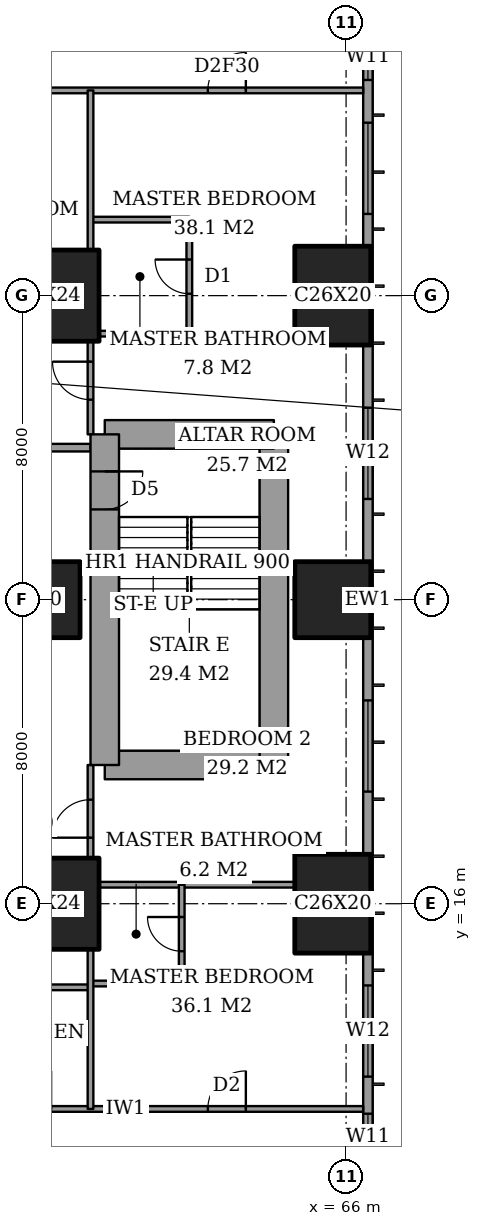
"""IFC4 building model, lengths in metres.
Left out: names, types, materials, properties, quantities, classifications, styles, units other than length and angle.
Written with IfcOpenShell. Run it as: python <this file> out.ifc"""

import sys

from ifc_helpers import new_model, si_unit, direction, frame, frame_2d, origin, origin_2d, place, context, subcontext, project, spatial, rectangle, extrude, element, fill, save


model = new_model("IFC4")
c1 = context("Model", 3, precision=1e-05, world=origin(), true_north=direction((0.0, 1.0)))
c2 = subcontext(c1, "Body", "Model", "MODEL_VIEW")
j1 = project(units=[si_unit("LENGTHUNIT", "METRE"), si_unit("PLANEANGLEUNIT", "RADIAN")], contexts=[c1])
p1 = place(None, origin())
s1 = spatial("IfcSite", under=j1, at=p1, CompositionType="ELEMENT")
p2 = place(p1, origin())
s2 = spatial("IfcBuilding", under=s1, at=p2, CompositionType="ELEMENT")
p3 = place(p2, frame((0.0, 0.0, 99.8)))
s3 = spatial("IfcBuildingStorey", under=s2, at=p3, CompositionType="ELEMENT", Elevation=99.8)
p4 = place(p3, frame((58.0, 16.0, 0.0), z_axis=(0.0, 0.0, 1.0), x_axis=(1.0, 0.0, 0.0)))
e1 = element("IfcColumn", 1, at=p4, inside=s3, PredefinedType="COLUMN", context=c2, shape_type="SweptSolid", body=[
    extrude(rectangle(XDim=3.0, YDim=2.4, at=origin_2d()), origin(), (0.0, 0.0, 1.0), 3.6),
])
p5 = place(p3, frame((58.0, 24.0, 0.0), z_axis=(0.0, 0.0, 1.0), x_axis=(1.0, 0.0, 0.0)))
e2 = element("IfcColumn", 2, at=p5, inside=s3, PredefinedType="COLUMN", context=c2, shape_type="SweptSolid", body=[
    extrude(rectangle(XDim=2.0, YDim=2.0, at=origin_2d()), origin(), (0.0, 0.0, 1.0), 3.6),
])
p6 = place(p3, frame((58.0, 32.0, 0.0), z_axis=(0.0, 0.0, 1.0), x_axis=(1.0, 0.0, 0.0)))
e3 = element("IfcColumn", 3, at=p6, inside=s3, PredefinedType="COLUMN", context=c2, shape_type="SweptSolid", body=[
    extrude(rectangle(XDim=3.0, YDim=2.4, at=origin_2d()), origin(), (0.0, 0.0, 1.0), 3.6),
])
p7 = place(p3, frame((65.65, 16.0, 0.0), z_axis=(0.0, 0.0, 1.0), x_axis=(0.0, 1.0, 0.0)))
e4 = element("IfcColumn", 4, at=p7, inside=s3, PredefinedType="COLUMN", context=c2, shape_type="SweptSolid", body=[
    extrude(rectangle(XDim=2.6, YDim=2.0, at=origin_2d()), origin(), (0.0, 0.0, 1.0), 3.6),
])
p8 = place(p3, frame((65.65, 24.0, 0.0), z_axis=(0.0, 0.0, 1.0), x_axis=(1.0, 0.0, 0.0)))
e5 = element("IfcColumn", 5, at=p8, inside=s3, PredefinedType="COLUMN", context=c2, shape_type="SweptSolid", body=[
    extrude(rectangle(XDim=2.0, YDim=2.0, at=origin_2d()), origin(), (0.0, 0.0, 1.0), 3.6),
])
p9 = place(p3, frame((65.65, 32.0, 0.0), z_axis=(0.0, 0.0, 1.0), x_axis=(0.0, 1.0, 0.0)))
e6 = element("IfcColumn", 6, at=p9, inside=s3, PredefinedType="COLUMN", context=c2, shape_type="SweptSolid", body=[
    extrude(rectangle(XDim=2.6, YDim=2.0, at=origin_2d()), origin(), (0.0, 0.0, 1.0), 3.6),
])
p10 = place(p3, frame((59.65, 19.65, 0.0), z_axis=(0.0, 0.0, 1.0), x_axis=(1.0, 0.0, 0.0)))
e7 = element("IfcWall", 7, at=p10, inside=s3, PredefinedType="SHEAR", context=c2, shape_type="SweptSolid", body=[
    extrude(rectangle(XDim=4.45, YDim=0.75, at=frame_2d((2.225, 0.0))), origin(), (0.0, 0.0, 1.0), 3.6),
])
p11 = place(p3, frame((64.1, 19.65, 0.0), z_axis=(0.0, 0.0, 1.0), x_axis=(0.0, 1.0, 0.0)))
e8 = element("IfcWall", 8, at=p11, inside=s3, PredefinedType="SHEAR", context=c2, shape_type="SweptSolid", body=[
    extrude(rectangle(XDim=8.7, YDim=0.75, at=frame_2d((4.35, 0.0))), origin(), (0.0, 0.0, 1.0), 3.6),
])
p12 = place(p3, frame((64.1, 28.35, 0.0), z_axis=(0.0, 0.0, 1.0), x_axis=(-1.0, 0.0, 0.0)))
e9 = element("IfcWall", 9, at=p12, inside=s3, PredefinedType="SHEAR", context=c2, shape_type="SweptSolid", body=[
    extrude(rectangle(XDim=4.45, YDim=0.75, at=frame_2d((2.225, 0.0))), origin(), (0.0, 0.0, 1.0), 3.6),
])
p13 = place(p3, frame((59.65, 28.35, 0.0), z_axis=(0.0, 0.0, 1.0), x_axis=(0.0, -1.0, 0.0)))
e10 = element("IfcWall", 10, at=p13, inside=s3, PredefinedType="SHEAR", context=c2, shape_type="SweptSolid", body=[
    extrude(rectangle(XDim=8.7, YDim=0.75, at=frame_2d((4.35, 0.0))), origin(), (0.0, 0.0, 1.0), 3.6),
])
p14 = place(p13, frame((0.975, 0.0, 0.0)))
e11 = element("IfcOpeningElement", 11, at=p14, cuts=e10, PredefinedType="OPENING", context=c2, shape_type="SweptSolid", body=[
    extrude(rectangle(XDim=1.0, YDim=2.1, at=frame_2d((0.5, 1.05))), frame((0.0, 0.385, 0.0), z_axis=(0.0, -1.0, 0.0), x_axis=(1.0, 0.0, 0.0)), (0.0, 0.0, 1.0), 0.77),
])
p15 = place(p3, frame((66.575, 3.175, 0.0), z_axis=(0.0, 0.0, 1.0), x_axis=(0.0, 1.0, 0.0)))
e12 = element("IfcWall", 12, at=p15, inside=s3, PredefinedType="SOLIDWALL", context=c2, shape_type="SweptSolid", body=[
    extrude(rectangle(XDim=41.65, YDim=0.25, at=frame_2d((20.825, 0.0))), origin(), (0.0, 0.0, 1.0), 3.6),
])
p16 = place(p15, frame((0.775, 0.0, 0.4)))
e13 = element("IfcOpeningElement", 13, at=p16, cuts=e12, PredefinedType="OPENING", context=c2, shape_type="SweptSolid", body=[
    extrude(rectangle(XDim=2.4, YDim=2.2, at=frame_2d((1.2, 1.1))), frame((0.0, 0.135, 0.0), z_axis=(0.0, -1.0, 0.0), x_axis=(1.0, 0.0, 0.0)), (0.0, 0.0, 1.0), 0.27),
])
p17 = place(p15, frame((6.1, 0.0, 0.4)))
e14 = element("IfcOpeningElement", 14, at=p17, cuts=e12, PredefinedType="OPENING", context=c2, shape_type="SweptSolid", body=[
    extrude(rectangle(XDim=1.2, YDim=2.2, at=frame_2d((0.6, 1.1))), frame((0.0, 0.135, 0.0), z_axis=(0.0, -1.0, 0.0), x_axis=(1.0, 0.0, 0.0)), (0.0, 0.0, 1.0), 0.27),
])
p18 = place(p15, frame((8.275, 0.0, 0.4)))
e15 = element("IfcOpeningElement", 15, at=p18, cuts=e12, PredefinedType="OPENING", context=c2, shape_type="SweptSolid", body=[
    extrude(rectangle(XDim=2.4, YDim=2.2, at=frame_2d((1.2, 1.1))), frame((0.0, 0.135, 0.0), z_axis=(0.0, -1.0, 0.0), x_axis=(1.0, 0.0, 0.0)), (0.0, 0.0, 1.0), 0.27),
])
p19 = place(p15, frame((15.775, 0.0, 0.4)))
e16 = element("IfcOpeningElement", 16, at=p19, cuts=e12, PredefinedType="OPENING", context=c2, shape_type="SweptSolid", body=[
    extrude(rectangle(XDim=2.4, YDim=2.2, at=frame_2d((1.2, 1.1))), frame((0.0, 0.135, 0.0), z_axis=(0.0, -1.0, 0.0), x_axis=(1.0, 0.0, 0.0)), (0.0, 0.0, 1.0), 0.27),
])
p20 = place(p15, frame((23.475, 0.0, 0.4)))
e17 = element("IfcOpeningElement", 17, at=p20, cuts=e12, PredefinedType="OPENING", context=c2, shape_type="SweptSolid", body=[
    extrude(rectangle(XDim=2.4, YDim=2.2, at=frame_2d((1.2, 1.1))), frame((0.0, 0.135, 0.0), z_axis=(0.0, -1.0, 0.0), x_axis=(1.0, 0.0, 0.0)), (0.0, 0.0, 1.0), 0.27),
])
p21 = place(p15, frame((30.975, 0.0, 0.4)))
e18 = element("IfcOpeningElement", 18, at=p21, cuts=e12, PredefinedType="OPENING", context=c2, shape_type="SweptSolid", body=[
    extrude(rectangle(XDim=2.4, YDim=2.2, at=frame_2d((1.2, 1.1))), frame((0.0, 0.135, 0.0), z_axis=(0.0, -1.0, 0.0), x_axis=(1.0, 0.0, 0.0)), (0.0, 0.0, 1.0), 0.27),
])
p22 = place(p15, frame((34.5, 0.0, 0.4)))
e19 = element("IfcOpeningElement", 19, at=p22, cuts=e12, PredefinedType="OPENING", context=c2, shape_type="SweptSolid", body=[
    extrude(rectangle(XDim=1.2, YDim=2.2, at=frame_2d((0.6, 1.1))), frame((0.0, 0.135, 0.0), z_axis=(0.0, -1.0, 0.0), x_axis=(1.0, 0.0, 0.0)), (0.0, 0.0, 1.0), 0.27),
])
p23 = place(p15, frame((38.475, 0.0, 0.4)))
e20 = element("IfcOpeningElement", 20, at=p23, cuts=e12, PredefinedType="OPENING", context=c2, shape_type="SweptSolid", body=[
    extrude(rectangle(XDim=2.4, YDim=2.2, at=frame_2d((1.2, 1.1))), frame((0.0, 0.135, 0.0), z_axis=(0.0, -1.0, 0.0), x_axis=(1.0, 0.0, 0.0)), (0.0, 0.0, 1.0), 0.27),
])
p24 = place(p3, frame((41.439, 10.6, 0.0), z_axis=(0.0, 0.0, 1.0), x_axis=(1.0, 0.0, 0.0)))
e21 = element("IfcWall", 21, at=p24, inside=s3, PredefinedType="PARTITIONING", context=c2, shape_type="SweptSolid", body=[
    extrude(rectangle(XDim=25.011, YDim=0.15, at=frame_2d((12.505, 0.0))), origin(), (0.0, 0.0, 1.0), 3.35),
])
p25 = place(p24, frame((10.761, 0.0, 0.0)))
e22 = element("IfcOpeningElement", 22, at=p25, cuts=e21, PredefinedType="OPENING", context=c2, shape_type="SweptSolid", body=[
    extrude(rectangle(XDim=1.0, YDim=2.1, at=frame_2d((0.5, 1.05))), frame((0.0, 0.085, 0.0), z_axis=(0.0, -1.0, 0.0), x_axis=(1.0, 0.0, 0.0)), (0.0, 0.0, 1.0), 0.17),
])
p26 = place(p24, frame((20.924, 0.0, 0.0)))
e23 = element("IfcOpeningElement", 23, at=p26, cuts=e21, PredefinedType="OPENING", context=c2, shape_type="SweptSolid", body=[
    extrude(rectangle(XDim=1.0, YDim=2.1, at=frame_2d((0.5, 1.05))), frame((0.0, 0.085, 0.0), z_axis=(0.0, -1.0, 0.0), x_axis=(1.0, 0.0, 0.0)), (0.0, 0.0, 1.0), 0.17),
])
p27 = place(p24, frame((15.799, 0.0, 0.0)))
e24 = element("IfcOpeningElement", 24, at=p27, cuts=e21, PredefinedType="OPENING", context=c2, shape_type="SweptSolid", body=[
    extrude(rectangle(XDim=1.0, YDim=2.1, at=frame_2d((0.5, 1.05))), frame((0.0, 0.085, 0.0), z_axis=(0.0, -1.0, 0.0), x_axis=(1.0, 0.0, 0.0)), (0.0, 0.0, 1.0), 0.17),
])
p28 = place(p24, frame((13.061, 0.0, 0.0)))
e25 = element("IfcOpeningElement", 25, at=p28, cuts=e21, PredefinedType="OPENING", context=c2, shape_type="SweptSolid", body=[
    extrude(rectangle(XDim=1.0, YDim=2.1, at=frame_2d((0.5, 1.05))), frame((0.0, 0.085, 0.0), z_axis=(0.0, -1.0, 0.0), x_axis=(1.0, 0.0, 0.0)), (0.0, 0.0, 1.0), 0.17),
])
p29 = place(p24, frame((7.911, 0.0, 0.0)))
e26 = element("IfcOpeningElement", 26, at=p29, cuts=e21, PredefinedType="OPENING", context=c2, shape_type="SweptSolid", body=[
    extrude(rectangle(XDim=0.9, YDim=2.1, at=frame_2d((0.45, 1.05))), frame((0.0, 0.085, 0.0), z_axis=(0.0, -1.0, 0.0), x_axis=(1.0, 0.0, 0.0)), (0.0, 0.0, 1.0), 0.17),
])
p30 = place(p24, frame((2.836, 0.0, 0.0)))
e27 = element("IfcOpeningElement", 27, at=p30, cuts=e21, PredefinedType="OPENING", context=c2, shape_type="SweptSolid", body=[
    extrude(rectangle(XDim=1.0, YDim=2.1, at=frame_2d((0.5, 1.05))), frame((0.0, 0.085, 0.0), z_axis=(0.0, -1.0, 0.0), x_axis=(1.0, 0.0, 0.0)), (0.0, 0.0, 1.0), 0.17),
])
p31 = place(p3, frame((56.2, 13.8, 0.0), z_axis=(0.0, 0.0, 1.0), x_axis=(1.0, 0.0, 0.0)))
e28 = element("IfcWall", 28, at=p31, inside=s3, PredefinedType="PARTITIONING", context=c2, shape_type="SweptSolid", body=[
    extrude(rectangle(XDim=3.075, YDim=0.15, at=frame_2d((1.538, 0.0))), origin(), (0.0, 0.0, 1.0), 3.35),
])
p32 = place(p3, frame((59.275, 13.9, 0.0), z_axis=(0.0, 0.0, 1.0), x_axis=(1.0, 0.0, 0.0)))
e29 = element("IfcWall", 29, at=p32, inside=s3, PredefinedType="PARTITIONING", context=c2, shape_type="SweptSolid", body=[
    extrude(rectangle(XDim=2.4, YDim=0.15, at=frame_2d((1.2, 0.0))), origin(), (0.0, 0.0, 1.0), 3.35),
])
p33 = place(p3, frame((59.5, 16.5, 0.0), z_axis=(0.0, 0.0, 1.0), x_axis=(1.0, 0.0, 0.0)))
e30 = element("IfcWall", 30, at=p33, inside=s3, PredefinedType="PARTITIONING", context=c2, shape_type="SweptSolid", body=[
    extrude(rectangle(XDim=5.15, YDim=0.15, at=frame_2d((2.575, 0.0))), origin(), (0.0, 0.0, 1.0), 3.35),
])
p34 = place(p3, frame((42.0, 28.0, 0.0), z_axis=(0.0, 0.0, 1.0), x_axis=(1.0, 0.0, 0.0)))
e31 = element("IfcWall", 31, at=p34, inside=s3, PredefinedType="PARTITIONING", context=c2, shape_type="SweptSolid", body=[
    extrude(rectangle(XDim=17.275, YDim=0.2, at=frame_2d((8.637, 0.0))), origin(), (0.0, 0.0, 1.0), 3.35),
])
p35 = place(p34, frame((8.9, 0.0, 0.0)))
e32 = element("IfcOpeningElement", 32, at=p35, cuts=e31, PredefinedType="OPENING", context=c2, shape_type="SweptSolid", body=[
    extrude(rectangle(XDim=1.2, YDim=2.4, at=frame_2d((0.6, 1.2))), frame((0.0, 0.11, 0.0), z_axis=(0.0, -1.0, 0.0), x_axis=(1.0, 0.0, 0.0)), (0.0, 0.0, 1.0), 0.22),
])
p36 = place(p3, frame((59.5, 31.0, 0.0), z_axis=(0.0, 0.0, 1.0), x_axis=(1.0, 0.0, 0.0)))
e33 = element("IfcWall", 33, at=p36, inside=s3, PredefinedType="PARTITIONING", context=c2, shape_type="SweptSolid", body=[
    extrude(rectangle(XDim=5.15, YDim=0.15, at=frame_2d((2.575, 0.0))), origin(), (0.0, 0.0, 1.0), 3.35),
])
p37 = place(p3, frame((59.275, 34.0, 0.0), z_axis=(0.0, 0.0, 1.0), x_axis=(1.0, 0.0, 0.0)))
e34 = element("IfcWall", 34, at=p37, inside=s3, PredefinedType="PARTITIONING", context=c2, shape_type="SweptSolid", body=[
    extrude(rectangle(XDim=2.6, YDim=0.15, at=frame_2d((1.3, 0.0))), origin(), (0.0, 0.0, 1.0), 3.35),
])
p38 = place(p3, frame((41.439, 37.4, 0.0), z_axis=(0.0, 0.0, 1.0), x_axis=(1.0, 0.0, 0.0)))
e35 = element("IfcWall", 35, at=p38, inside=s3, PredefinedType="PARTITIONING", context=c2, shape_type="SweptSolid", body=[
    extrude(rectangle(XDim=25.011, YDim=0.15, at=frame_2d((12.505, 0.0))), origin(), (0.0, 0.0, 1.0), 3.35),
])
p39 = place(p38, frame((11.961, 0.0, 0.0)))
e36 = element("IfcOpeningElement", 36, at=p39, cuts=e35, PredefinedType="OPENING", context=c2, shape_type="SweptSolid", body=[
    extrude(rectangle(XDim=1.0, YDim=2.1, at=frame_2d((0.5, 1.05))), frame((0.0, 0.085, 0.0), z_axis=(0.0, -1.0, 0.0), x_axis=(1.0, 0.0, 0.0)), (0.0, 0.0, 1.0), 0.17),
])
p40 = place(p38, frame((20.924, 0.0, 0.0)))
e37 = element("IfcOpeningElement", 37, at=p40, cuts=e35, PredefinedType="OPENING", context=c2, shape_type="SweptSolid", body=[
    extrude(rectangle(XDim=1.0, YDim=2.1, at=frame_2d((0.5, 1.05))), frame((0.0, 0.085, 0.0), z_axis=(0.0, -1.0, 0.0), x_axis=(1.0, 0.0, 0.0)), (0.0, 0.0, 1.0), 0.17),
])
p41 = place(p38, frame((15.249, 0.0, 0.0)))
e38 = element("IfcOpeningElement", 38, at=p41, cuts=e35, PredefinedType="OPENING", context=c2, shape_type="SweptSolid", body=[
    extrude(rectangle(XDim=0.9, YDim=2.1, at=frame_2d((0.45, 1.05))), frame((0.0, 0.085, 0.0), z_axis=(0.0, -1.0, 0.0), x_axis=(1.0, 0.0, 0.0)), (0.0, 0.0, 1.0), 0.17),
])
p42 = place(p38, frame((9.561, 0.0, 0.0)))
e39 = element("IfcOpeningElement", 39, at=p42, cuts=e35, PredefinedType="OPENING", context=c2, shape_type="SweptSolid", body=[
    extrude(rectangle(XDim=1.0, YDim=2.1, at=frame_2d((0.5, 1.05))), frame((0.0, 0.085, 0.0), z_axis=(0.0, -1.0, 0.0), x_axis=(1.0, 0.0, 0.0)), (0.0, 0.0, 1.0), 0.17),
])
p43 = place(p38, frame((7.161, 0.0, 0.0)))
e40 = element("IfcOpeningElement", 40, at=p43, cuts=e35, PredefinedType="OPENING", context=c2, shape_type="SweptSolid", body=[
    extrude(rectangle(XDim=1.0, YDim=2.1, at=frame_2d((0.5, 1.05))), frame((0.0, 0.085, 0.0), z_axis=(0.0, -1.0, 0.0), x_axis=(1.0, 0.0, 0.0)), (0.0, 0.0, 1.0), 0.17),
])
p44 = place(p38, frame((2.836, 0.0, 0.0)))
e41 = element("IfcOpeningElement", 41, at=p44, cuts=e35, PredefinedType="OPENING", context=c2, shape_type="SweptSolid", body=[
    extrude(rectangle(XDim=1.0, YDim=2.1, at=frame_2d((0.5, 1.05))), frame((0.0, 0.085, 0.0), z_axis=(0.0, -1.0, 0.0), x_axis=(1.0, 0.0, 0.0)), (0.0, 0.0, 1.0), 0.17),
])
p45 = place(p3, frame((59.275, 10.6, 0.0), z_axis=(0.0, 0.0, 1.0), x_axis=(0.0, 1.0, 0.0)))
e42 = element("IfcWall", 42, at=p45, inside=s3, PredefinedType="PARTITIONING", context=c2, shape_type="SweptSolid", body=[
    extrude(rectangle(XDim=4.2, YDim=0.15, at=frame_2d((2.1, 0.0))), origin(), (0.0, 0.0, 1.0), 3.35),
])
p46 = place(p3, frame((59.275, 17.2, 0.0), z_axis=(0.0, 0.0, 1.0), x_axis=(0.0, 1.0, 0.0)))
e43 = element("IfcWall", 43, at=p46, inside=s3, PredefinedType="PARTITIONING", context=c2, shape_type="SweptSolid", body=[
    extrude(rectangle(XDim=2.45, YDim=0.15, at=frame_2d((1.225, 0.0))), origin(), (0.0, 0.0, 1.0), 3.35),
])
p47 = place(p46, frame((0.538, 0.0, 0.0)))
e44 = element("IfcOpeningElement", 44, at=p47, cuts=e43, PredefinedType="OPENING", context=c2, shape_type="SweptSolid", body=[
    extrude(rectangle(XDim=1.0, YDim=2.1, at=frame_2d((0.5, 1.05))), frame((0.0, 0.085, 0.0), z_axis=(0.0, -1.0, 0.0), x_axis=(1.0, 0.0, 0.0)), (0.0, 0.0, 1.0), 0.17),
])
p48 = place(p3, frame((59.275, 28.35, 0.0), z_axis=(0.0, 0.0, 1.0), x_axis=(0.0, 1.0, 0.0)))
e45 = element("IfcWall", 45, at=p48, inside=s3, PredefinedType="PARTITIONING", context=c2, shape_type="SweptSolid", body=[
    extrude(rectangle(XDim=2.45, YDim=0.15, at=frame_2d((1.225, 0.0))), origin(), (0.0, 0.0, 1.0), 3.35),
])
p49 = place(p48, frame((0.913, 0.0, 0.0)))
e46 = element("IfcOpeningElement", 46, at=p49, cuts=e45, PredefinedType="OPENING", context=c2, shape_type="SweptSolid", body=[
    extrude(rectangle(XDim=1.0, YDim=2.1, at=frame_2d((0.5, 1.05))), frame((0.0, 0.085, 0.0), z_axis=(0.0, -1.0, 0.0), x_axis=(1.0, 0.0, 0.0)), (0.0, 0.0, 1.0), 0.17),
])
p50 = place(p3, frame((59.275, 33.2, 0.0), z_axis=(0.0, 0.0, 1.0), x_axis=(0.0, 1.0, 0.0)))
e47 = element("IfcWall", 47, at=p50, inside=s3, PredefinedType="PARTITIONING", context=c2, shape_type="SweptSolid", body=[
    extrude(rectangle(XDim=4.2, YDim=0.15, at=frame_2d((2.1, 0.0))), origin(), (0.0, 0.0, 1.0), 3.35),
])
p51 = place(p3, frame((61.675, 13.9, 0.0), z_axis=(0.0, 0.0, 1.0), x_axis=(0.0, 1.0, 0.0)))
e48 = element("IfcWall", 48, at=p51, inside=s3, PredefinedType="PARTITIONING", context=c2, shape_type="SweptSolid", body=[
    extrude(rectangle(XDim=2.6, YDim=0.15, at=frame_2d((1.3, 0.0))), origin(), (0.0, 0.0, 1.0), 3.35),
])
p52 = place(p51, frame((0.85, 0.0, 0.0)))
e49 = element("IfcOpeningElement", 49, at=p52, cuts=e48, PredefinedType="OPENING", context=c2, shape_type="SweptSolid", body=[
    extrude(rectangle(XDim=0.9, YDim=2.1, at=frame_2d((0.45, 1.05))), frame((0.0, 0.085, 0.0), z_axis=(0.0, -1.0, 0.0), x_axis=(1.0, 0.0, 0.0)), (0.0, 0.0, 1.0), 0.17),
])
p53 = place(p3, frame((61.875, 31.0, 0.0), z_axis=(0.0, 0.0, 1.0), x_axis=(0.0, 1.0, 0.0)))
e50 = element("IfcWall", 50, at=p53, inside=s3, PredefinedType="PARTITIONING", context=c2, shape_type="SweptSolid", body=[
    extrude(rectangle(XDim=3.0, YDim=0.15, at=frame_2d((1.5, 0.0))), origin(), (0.0, 0.0, 1.0), 3.35),
])
p54 = place(p53, frame((1.05, 0.0, 0.0)))
e51 = element("IfcOpeningElement", 51, at=p54, cuts=e50, PredefinedType="OPENING", context=c2, shape_type="SweptSolid", body=[
    extrude(rectangle(XDim=0.9, YDim=2.1, at=frame_2d((0.45, 1.05))), frame((0.0, 0.085, 0.0), z_axis=(0.0, -1.0, 0.0), x_axis=(1.0, 0.0, 0.0)), (0.0, 0.0, 1.0), 0.17),
])
p55 = place(p17, origin())
e52 = element("IfcWindow", 52, at=p55, inside=s3, PartitioningType="SINGLE_PANEL", PredefinedType="WINDOW", context=c2, shape_type="SweptSolid", body=[
    extrude(rectangle(XDim=1.2, YDim=2.2, at=frame_2d((0.6, 1.1))), frame((0.0, 0.03, 0.0), z_axis=(0.0, -1.0, 0.0), x_axis=(1.0, 0.0, 0.0)), (0.0, 0.0, 1.0), 0.06),
])
fill(e14, e52)
p56 = place(p18, origin())
e53 = element("IfcWindow", 53, at=p56, inside=s3, PartitioningType="SINGLE_PANEL", PredefinedType="WINDOW", context=c2, shape_type="SweptSolid", body=[
    extrude(rectangle(XDim=2.4, YDim=2.2, at=frame_2d((1.2, 1.1))), frame((0.0, 0.03, 0.0), z_axis=(0.0, -1.0, 0.0), x_axis=(1.0, 0.0, 0.0)), (0.0, 0.0, 1.0), 0.06),
])
fill(e15, e53)
p57 = place(p19, origin())
e54 = element("IfcWindow", 54, at=p57, inside=s3, PartitioningType="SINGLE_PANEL", PredefinedType="WINDOW", context=c2, shape_type="SweptSolid", body=[
    extrude(rectangle(XDim=2.4, YDim=2.2, at=frame_2d((1.2, 1.1))), frame((0.0, 0.03, 0.0), z_axis=(0.0, -1.0, 0.0), x_axis=(1.0, 0.0, 0.0)), (0.0, 0.0, 1.0), 0.06),
])
fill(e16, e54)
p58 = place(p20, origin())
e55 = element("IfcWindow", 55, at=p58, inside=s3, PartitioningType="SINGLE_PANEL", PredefinedType="WINDOW", context=c2, shape_type="SweptSolid", body=[
    extrude(rectangle(XDim=2.4, YDim=2.2, at=frame_2d((1.2, 1.1))), frame((0.0, 0.03, 0.0), z_axis=(0.0, -1.0, 0.0), x_axis=(1.0, 0.0, 0.0)), (0.0, 0.0, 1.0), 0.06),
])
fill(e17, e55)
p59 = place(p21, origin())
e56 = element("IfcWindow", 56, at=p59, inside=s3, PartitioningType="SINGLE_PANEL", PredefinedType="WINDOW", context=c2, shape_type="SweptSolid", body=[
    extrude(rectangle(XDim=2.4, YDim=2.2, at=frame_2d((1.2, 1.1))), frame((0.0, 0.03, 0.0), z_axis=(0.0, -1.0, 0.0), x_axis=(1.0, 0.0, 0.0)), (0.0, 0.0, 1.0), 0.06),
])
fill(e18, e56)
p60 = place(p22, origin())
e57 = element("IfcWindow", 57, at=p60, inside=s3, PartitioningType="SINGLE_PANEL", PredefinedType="WINDOW", context=c2, shape_type="SweptSolid", body=[
    extrude(rectangle(XDim=1.2, YDim=2.2, at=frame_2d((0.6, 1.1))), frame((0.0, 0.03, 0.0), z_axis=(0.0, -1.0, 0.0), x_axis=(1.0, 0.0, 0.0)), (0.0, 0.0, 1.0), 0.06),
])
fill(e19, e57)
p61 = place(p52, origin())
e58 = element("IfcDoor", 58, at=p61, inside=s3, OperationType="SINGLE_SWING_LEFT", PredefinedType="DOOR", context=c2, shape_type="SweptSolid", body=[
    extrude(rectangle(XDim=0.9, YDim=2.1, at=frame_2d((0.45, 1.05))), frame((0.0, 0.025, 0.0), z_axis=(0.0, -1.0, 0.0), x_axis=(1.0, 0.0, 0.0)), (0.0, 0.0, 1.0), 0.05),
])
fill(e49, e58)
p62 = place(p26, origin())
e59 = element("IfcDoor", 59, at=p62, inside=s3, OperationType="SINGLE_SWING_LEFT", PredefinedType="DOOR", context=c2, shape_type="SweptSolid", body=[
    extrude(rectangle(XDim=1.0, YDim=2.1, at=frame_2d((0.5, 1.05))), frame((0.0, 0.025, 0.0), z_axis=(0.0, -1.0, 0.0), x_axis=(1.0, 0.0, 0.0)), (0.0, 0.0, 1.0), 0.05),
])
fill(e23, e59)
p63 = place(p47, origin())
e60 = element("IfcDoor", 60, at=p63, inside=s3, OperationType="SINGLE_SWING_RIGHT", PredefinedType="DOOR", context=c2, shape_type="SweptSolid", body=[
    extrude(rectangle(XDim=1.0, YDim=2.1, at=frame_2d((0.5, 1.05))), frame((0.0, 0.025, 0.0), z_axis=(0.0, -1.0, 0.0), x_axis=(1.0, 0.0, 0.0)), (0.0, 0.0, 1.0), 0.05),
])
fill(e44, e60)
p64 = place(p54, origin())
e61 = element("IfcDoor", 61, at=p64, inside=s3, OperationType="SINGLE_SWING_LEFT", PredefinedType="DOOR", context=c2, shape_type="SweptSolid", body=[
    extrude(rectangle(XDim=0.9, YDim=2.1, at=frame_2d((0.45, 1.05))), frame((0.0, 0.025, 0.0), z_axis=(0.0, -1.0, 0.0), x_axis=(1.0, 0.0, 0.0)), (0.0, 0.0, 1.0), 0.05),
])
fill(e51, e61)
p65 = place(p40, origin())
e62 = element("IfcDoor", 62, at=p65, inside=s3, OperationType="SINGLE_SWING_LEFT", PredefinedType="DOOR", context=c2, shape_type="SweptSolid", body=[
    extrude(rectangle(XDim=1.0, YDim=2.1, at=frame_2d((0.5, 1.05))), frame((0.0, 0.025, 0.0), z_axis=(0.0, -1.0, 0.0), x_axis=(1.0, 0.0, 0.0)), (0.0, 0.0, 1.0), 0.05),
])
fill(e37, e62)
p66 = place(p49, origin())
e63 = element("IfcDoor", 63, at=p66, inside=s3, OperationType="SINGLE_SWING_LEFT", PredefinedType="DOOR", context=c2, shape_type="SweptSolid", body=[
    extrude(rectangle(XDim=1.0, YDim=2.1, at=frame_2d((0.5, 1.05))), frame((0.0, 0.025, 0.0), z_axis=(0.0, -1.0, 0.0), x_axis=(1.0, 0.0, 0.0)), (0.0, 0.0, 1.0), 0.05),
])
fill(e46, e63)
p67 = place(p14, origin())
e64 = element("IfcDoor", 64, at=p67, inside=s3, OperationType="SINGLE_SWING_RIGHT", PredefinedType="DOOR", context=c2, shape_type="SweptSolid", body=[
    extrude(rectangle(XDim=1.0, YDim=2.1, at=frame_2d((0.5, 1.05))), frame((0.0, 0.025, 0.0), z_axis=(0.0, -1.0, 0.0), x_axis=(1.0, 0.0, 0.0)), (0.0, 0.0, 1.0), 0.05),
])
fill(e11, e64)
save(model, sys.argv[1])
